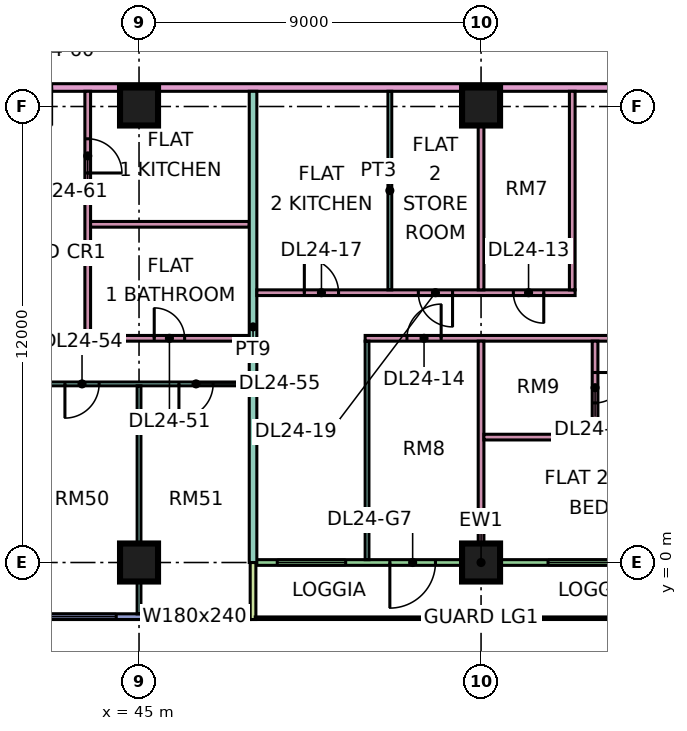
"""IFC4 building model, lengths in metres.
Left out: names, types, materials, properties, quantities, classifications, styles, units other than length and angle.
Written with IfcOpenShell. Run it as: python <this file> out.ifc"""

import sys

from ifc_helpers import new_model, si_unit, direction, frame, frame_2d, origin, origin_2d, place, context, subcontext, project, spatial, rectangle, extrude, element, fill, save


model = new_model("IFC4")
c1 = context("Model", 3, precision=1e-05, world=origin(), true_north=direction((0.0, 1.0)))
c2 = subcontext(c1, "Body", "Model", "MODEL_VIEW")
j1 = project(units=[si_unit("LENGTHUNIT", "METRE"), si_unit("PLANEANGLEUNIT", "RADIAN")], contexts=[c1])
p1 = place(None, origin())
s1 = spatial("IfcSite", under=j1, at=p1, CompositionType="ELEMENT")
p2 = place(p1, origin())
s2 = spatial("IfcBuilding", under=s1, at=p2, CompositionType="ELEMENT")
p3 = place(p2, frame((0.0, 0.0, 106.9)))
s3 = spatial("IfcBuildingStorey", under=s2, at=p3, CompositionType="ELEMENT", Elevation=106.9)
for number, where, z_axis, x_axis in (
    (1, (45.0, 0.0, 0.0), (0.0, 0.0, 1.0), (1.0, 0.0, 0.0)),
    (2, (45.0, 12.0, 0.0), (0.0, 0.0, 1.0), (1.0, 0.0, 0.0)),
    (3, (54.0, 0.0, 0.0), (0.0, 0.0, 1.0), (1.0, 0.0, 0.0)),
    (4, (54.0, 12.0, 0.0), (0.0, 0.0, 1.0), (1.0, 0.0, 0.0)),
):
    element("IfcColumn", number, at=place(p3, frame(where, z_axis=z_axis, x_axis=x_axis)), inside=s3, PredefinedType="COLUMN", context=c2, shape_type="SweptSolid", body=[
        extrude(rectangle(XDim=1.0, YDim=1.0, at=origin_2d()), origin(), (0.0, 0.0, 1.0), 3.75),
    ])
p4 = place(p3, frame((36.075, -1.425, 0.0), z_axis=(0.0, 0.0, 1.0), x_axis=(1.0, 0.0, 0.0)))
e5 = element("IfcWall", 5, at=p4, inside=s3, PredefinedType="SOLIDWALL", context=c2, shape_type="SweptSolid", body=[
    extrude(rectangle(XDim=11.85, YDim=0.15, at=frame_2d((5.925, 0.0))), origin(), (0.0, 0.0, 1.0), 3.35),
])
p5 = place(p4, frame((1.462, 0.0, 0.45)))
e6 = element("IfcOpeningElement", 6, at=p5, cuts=e5, PredefinedType="OPENING", context=c2, shape_type="SweptSolid", body=[
    extrude(rectangle(XDim=3.0, YDim=2.4, at=frame_2d((1.5, 1.2))), frame((0.0, 0.085, 0.0), z_axis=(0.0, -1.0, 0.0), x_axis=(1.0, 0.0, 0.0)), (0.0, 0.0, 1.0), 0.17),
])
p6 = place(p4, frame((6.525, 0.0, 0.45)))
e7 = element("IfcOpeningElement", 7, at=p6, cuts=e5, PredefinedType="OPENING", context=c2, shape_type="SweptSolid", body=[
    extrude(rectangle(XDim=1.8, YDim=2.4, at=frame_2d((0.9, 1.2))), frame((0.0, 0.085, 0.0), z_axis=(0.0, -1.0, 0.0), x_axis=(1.0, 0.0, 0.0)), (0.0, 0.0, 1.0), 0.17),
])
p7 = place(p4, frame((9.488, 0.0, 0.45)))
e8 = element("IfcOpeningElement", 8, at=p7, cuts=e5, PredefinedType="OPENING", context=c2, shape_type="SweptSolid", body=[
    extrude(rectangle(XDim=1.8, YDim=2.4, at=frame_2d((0.9, 1.2))), frame((0.0, 0.085, 0.0), z_axis=(0.0, -1.0, 0.0), x_axis=(1.0, 0.0, 0.0)), (0.0, 0.0, 1.0), 0.17),
])
p8 = place(p3, frame((48.075, 0.0, 0.0), z_axis=(0.0, 0.0, 1.0), x_axis=(1.0, 0.0, 0.0)))
e9 = element("IfcWall", 9, at=p8, inside=s3, PredefinedType="SOLIDWALL", context=c2, shape_type="SweptSolid", body=[
    extrude(rectangle(XDim=11.85, YDim=0.15, at=frame_2d((5.925, 0.0))), origin(), (0.0, 0.0, 1.0), 3.35),
])
p9 = place(p8, frame((0.562, 0.0, 0.45)))
e10 = element("IfcOpeningElement", 10, at=p9, cuts=e9, PredefinedType="OPENING", context=c2, shape_type="SweptSolid", body=[
    extrude(rectangle(XDim=1.8, YDim=2.4, at=frame_2d((0.9, 1.2))), frame((0.0, 0.085, 0.0), z_axis=(0.0, -1.0, 0.0), x_axis=(1.0, 0.0, 0.0)), (0.0, 0.0, 1.0), 0.17),
])
p10 = place(p8, frame((3.525, 0.0, 0.0)))
e11 = element("IfcOpeningElement", 11, at=p10, cuts=e9, PredefinedType="OPENING", context=c2, shape_type="SweptSolid", body=[
    extrude(rectangle(XDim=1.2, YDim=2.4, at=frame_2d((0.6, 1.2))), frame((0.0, 0.085, 0.0), z_axis=(0.0, -1.0, 0.0), x_axis=(1.0, 0.0, 0.0)), (0.0, 0.0, 1.0), 0.17),
])
p11 = place(p8, frame((7.688, 0.0, 0.45)))
e12 = element("IfcOpeningElement", 12, at=p11, cuts=e9, PredefinedType="OPENING", context=c2, shape_type="SweptSolid", body=[
    extrude(rectangle(XDim=3.0, YDim=2.4, at=frame_2d((1.5, 1.2))), frame((0.0, 0.085, 0.0), z_axis=(0.0, -1.0, 0.0), x_axis=(1.0, 0.0, 0.0)), (0.0, 0.0, 1.0), 0.17),
])
p12 = place(p3, frame((48.0, -1.5, 0.0), z_axis=(0.0, 0.0, 1.0), x_axis=(0.0, 1.0, 0.0)))
e13 = element("IfcWall", 13, at=p12, inside=s3, PredefinedType="SOLIDWALL", context=c2, shape_type="SweptSolid", body=[
    extrude(rectangle(XDim=1.5, YDim=0.15, at=frame_2d((0.75, 0.0))), origin(), (0.0, 0.0, 1.0), 3.35),
])
p13 = place(p3, frame((33.05, 4.7, 0.0), z_axis=(0.0, 0.0, 1.0), x_axis=(1.0, 0.0, 0.0)))
e14 = element("IfcWall", 14, at=p13, inside=s3, PredefinedType="PARTITIONING", context=c2, shape_type="SweptSolid", body=[
    extrude(rectangle(XDim=14.85, YDim=0.1, at=frame_2d((7.425, 0.0))), origin(), (0.0, 0.0, 1.0), 3.35),
])
p14 = place(p13, frame((10.0, 0.0, 0.0)))
e15 = element("IfcOpeningElement", 15, at=p14, cuts=e14, PredefinedType="OPENING", context=c2, shape_type="SweptSolid", body=[
    extrude(rectangle(XDim=0.9, YDim=2.1, at=frame_2d((0.45, 1.05))), frame((0.0, 0.06, 0.0), z_axis=(0.0, -1.0, 0.0), x_axis=(1.0, 0.0, 0.0)), (0.0, 0.0, 1.0), 0.12),
])
p15 = place(p13, frame((13.0, 0.0, 0.0)))
e16 = element("IfcOpeningElement", 16, at=p15, cuts=e14, PredefinedType="OPENING", context=c2, shape_type="SweptSolid", body=[
    extrude(rectangle(XDim=0.9, YDim=2.1, at=frame_2d((0.45, 1.05))), frame((0.0, 0.06, 0.0), z_axis=(0.0, -1.0, 0.0), x_axis=(1.0, 0.0, 0.0)), (0.0, 0.0, 1.0), 0.12),
])
p16 = place(p13, frame((4.0, 0.0, 0.0)))
e17 = element("IfcOpeningElement", 17, at=p16, cuts=e14, PredefinedType="OPENING", context=c2, shape_type="SweptSolid", body=[
    extrude(rectangle(XDim=0.9, YDim=2.1, at=frame_2d((0.45, 1.05))), frame((0.0, 0.06, 0.0), z_axis=(0.0, -1.0, 0.0), x_axis=(1.0, 0.0, 0.0)), (0.0, 0.0, 1.0), 0.12),
])
p17 = place(p3, frame((40.65, 12.5, 0.0), z_axis=(0.0, 0.0, 1.0), x_axis=(1.0, 0.0, 0.0)))
e18 = element("IfcWall", 18, at=p17, inside=s3, PredefinedType="PARTITIONING", context=c2, shape_type="SweptSolid", body=[
    extrude(rectangle(XDim=31.35, YDim=0.2, at=frame_2d((15.675, 0.0))), origin(), (0.0, 0.0, 1.0), 3.35),
])
p18 = place(p17, frame((17.1, 0.0, 0.0)))
e19 = element("IfcOpeningElement", 19, at=p18, cuts=e18, PredefinedType="OPENING", context=c2, shape_type="SweptSolid", body=[
    extrude(rectangle(XDim=1.0, YDim=2.1, at=frame_2d((0.5, 1.05))), frame((0.0, 0.11, 0.0), z_axis=(0.0, -1.0, 0.0), x_axis=(1.0, 0.0, 0.0)), (0.0, 0.0, 1.0), 0.22),
])
p19 = place(p17, frame((23.7, 0.0, 0.0)))
e20 = element("IfcOpeningElement", 20, at=p19, cuts=e18, PredefinedType="OPENING", context=c2, shape_type="SweptSolid", body=[
    extrude(rectangle(XDim=1.0, YDim=2.1, at=frame_2d((0.5, 1.05))), frame((0.0, 0.11, 0.0), z_axis=(0.0, -1.0, 0.0), x_axis=(1.0, 0.0, 0.0)), (0.0, 0.0, 1.0), 0.22),
])
p20 = place(p17, frame((1.05, 0.0, 0.0)))
e21 = element("IfcOpeningElement", 21, at=p20, cuts=e18, PredefinedType="OPENING", context=c2, shape_type="SweptSolid", body=[
    extrude(rectangle(XDim=1.0, YDim=2.1, at=frame_2d((0.5, 1.05))), frame((0.0, 0.11, 0.0), z_axis=(0.0, -1.0, 0.0), x_axis=(1.0, 0.0, 0.0)), (0.0, 0.0, 1.0), 0.22),
])
p21 = place(p3, frame((43.65, 5.825, 0.0), z_axis=(0.0, 0.0, 1.0), x_axis=(0.0, 1.0, 0.0)))
e22 = element("IfcWall", 22, at=p21, inside=s3, PredefinedType="PARTITIONING", context=c2, shape_type="SweptSolid", body=[
    extrude(rectangle(XDim=6.575, YDim=0.15, at=frame_2d((3.288, 0.0))), origin(), (0.0, 0.0, 1.0), 3.35),
])
p22 = place(p21, frame((4.425, 0.0, 0.0)))
e23 = element("IfcOpeningElement", 23, at=p22, cuts=e22, PredefinedType="OPENING", context=c2, shape_type="SweptSolid", body=[
    extrude(rectangle(XDim=0.9, YDim=2.1, at=frame_2d((0.45, 1.05))), frame((0.0, 0.085, 0.0), z_axis=(0.0, -1.0, 0.0), x_axis=(1.0, 0.0, 0.0)), (0.0, 0.0, 1.0), 0.17),
])
p23 = place(p3, frame((43.725, 5.9, 0.0), z_axis=(0.0, 0.0, 1.0), x_axis=(1.0, 0.0, 0.0)))
e24 = element("IfcWall", 24, at=p23, inside=s3, PredefinedType="PARTITIONING", context=c2, shape_type="SweptSolid", body=[
    extrude(rectangle(XDim=4.175, YDim=0.15, at=frame_2d((2.087, 0.0))), origin(), (0.0, 0.0, 1.0), 3.35),
])
p24 = place(p23, frame((1.675, 0.0, 0.0)))
e25 = element("IfcOpeningElement", 25, at=p24, cuts=e24, PredefinedType="OPENING", context=c2, shape_type="SweptSolid", body=[
    extrude(rectangle(XDim=0.8, YDim=2.1, at=frame_2d((0.4, 1.05))), frame((0.0, 0.085, 0.0), z_axis=(0.0, -1.0, 0.0), x_axis=(1.0, 0.0, 0.0)), (0.0, 0.0, 1.0), 0.17),
])
p25 = place(p3, frame((43.725, 8.9, 0.0), z_axis=(0.0, 0.0, 1.0), x_axis=(1.0, 0.0, 0.0)))
e26 = element("IfcWall", 26, at=p25, inside=s3, PredefinedType="PARTITIONING", context=c2, shape_type="SweptSolid", body=[
    extrude(rectangle(XDim=4.175, YDim=0.15, at=frame_2d((2.087, 0.0))), origin(), (0.0, 0.0, 1.0), 3.35),
])
p26 = place(p3, frame((45.0, -1.351, 0.0), z_axis=(0.0, 0.0, 1.0), x_axis=(0.0, 1.0, 0.0)))
e27 = element("IfcWall", 27, at=p26, inside=s3, PredefinedType="PARTITIONING", context=c2, shape_type="SweptSolid", body=[
    extrude(rectangle(XDim=6.001, YDim=0.1, at=frame_2d((3.0, 0.0))), origin(), (0.0, 0.0, 1.0), 3.35),
])
p27 = place(p3, frame((48.0, 0.0, 0.0), z_axis=(0.0, 0.0, 1.0), x_axis=(0.0, 1.0, 0.0)))
e28 = element("IfcWall", 28, at=p27, inside=s3, PredefinedType="PARTITIONING", context=c2, shape_type="SweptSolid", body=[
    extrude(rectangle(XDim=12.4, YDim=0.2, at=frame_2d((6.2, 0.0))), origin(), (0.0, 0.0, 1.0), 3.35),
])
p28 = place(p3, frame((48.1, 7.1, 0.0), z_axis=(0.0, 0.0, 1.0), x_axis=(1.0, 0.0, 0.0)))
e29 = element("IfcWall", 29, at=p28, inside=s3, PredefinedType="PARTITIONING", context=c2, shape_type="SweptSolid", body=[
    extrude(rectangle(XDim=8.375, YDim=0.15, at=frame_2d((4.188, 0.0))), origin(), (0.0, 0.0, 1.0), 3.35),
])
p29 = place(p28, frame((6.75, 0.0, 0.0)))
e30 = element("IfcOpeningElement", 30, at=p29, cuts=e29, PredefinedType="OPENING", context=c2, shape_type="SweptSolid", body=[
    extrude(rectangle(XDim=0.8, YDim=2.1, at=frame_2d((0.4, 1.05))), frame((0.0, 0.085, 0.0), z_axis=(0.0, -1.0, 0.0), x_axis=(1.0, 0.0, 0.0)), (0.0, 0.0, 1.0), 0.17),
])
p30 = place(p28, frame((1.25, 0.0, 0.0)))
e31 = element("IfcOpeningElement", 31, at=p30, cuts=e29, PredefinedType="OPENING", context=c2, shape_type="SweptSolid", body=[
    extrude(rectangle(XDim=0.9, YDim=2.1, at=frame_2d((0.45, 1.05))), frame((0.0, 0.085, 0.0), z_axis=(0.0, -1.0, 0.0), x_axis=(1.0, 0.0, 0.0)), (0.0, 0.0, 1.0), 0.17),
])
p31 = place(p28, frame((4.25, 0.0, 0.0)))
e32 = element("IfcOpeningElement", 32, at=p31, cuts=e29, PredefinedType="OPENING", context=c2, shape_type="SweptSolid", body=[
    extrude(rectangle(XDim=0.9, YDim=2.1, at=frame_2d((0.45, 1.05))), frame((0.0, 0.085, 0.0), z_axis=(0.0, -1.0, 0.0), x_axis=(1.0, 0.0, 0.0)), (0.0, 0.0, 1.0), 0.17),
])
p32 = place(p3, frame((50.95, 5.9, 0.0), z_axis=(0.0, 0.0, 1.0), x_axis=(1.0, 0.0, 0.0)))
e33 = element("IfcWall", 33, at=p32, inside=s3, PredefinedType="PARTITIONING", context=c2, shape_type="SweptSolid", body=[
    extrude(rectangle(XDim=8.95, YDim=0.15, at=frame_2d((4.475, 0.0))), origin(), (0.0, 0.0, 1.0), 3.35),
])
p33 = place(p32, frame((1.1, 0.0, 0.0)))
e34 = element("IfcOpeningElement", 34, at=p33, cuts=e33, PredefinedType="OPENING", context=c2, shape_type="SweptSolid", body=[
    extrude(rectangle(XDim=0.9, YDim=2.1, at=frame_2d((0.45, 1.05))), frame((0.0, 0.085, 0.0), z_axis=(0.0, -1.0, 0.0), x_axis=(1.0, 0.0, 0.0)), (0.0, 0.0, 1.0), 0.17),
])
p34 = place(p32, frame((7.1, 0.0, 0.0)))
e35 = element("IfcOpeningElement", 35, at=p34, cuts=e33, PredefinedType="OPENING", context=c2, shape_type="SweptSolid", body=[
    extrude(rectangle(XDim=0.9, YDim=2.1, at=frame_2d((0.45, 1.05))), frame((0.0, 0.085, 0.0), z_axis=(0.0, -1.0, 0.0), x_axis=(1.0, 0.0, 0.0)), (0.0, 0.0, 1.0), 0.17),
])
p35 = place(p3, frame((51.0, 0.074, 0.0), z_axis=(0.0, 0.0, 1.0), x_axis=(0.0, 1.0, 0.0)))
e36 = element("IfcWall", 36, at=p35, inside=s3, PredefinedType="PARTITIONING", context=c2, shape_type="SweptSolid", body=[
    extrude(rectangle(XDim=5.751, YDim=0.1, at=frame_2d((2.875, 0.0))), origin(), (0.0, 0.0, 1.0), 3.35),
])
p36 = place(p3, frame((51.6, 7.175, 0.0), z_axis=(0.0, 0.0, 1.0), x_axis=(0.0, 1.0, 0.0)))
e37 = element("IfcWall", 37, at=p36, inside=s3, PredefinedType="PARTITIONING", context=c2, shape_type="SweptSolid", body=[
    extrude(rectangle(XDim=5.225, YDim=0.1, at=frame_2d((2.612, 0.0))), origin(), (0.0, 0.0, 1.0), 3.35),
])
p37 = place(p3, frame((54.0, 0.074, 0.0), z_axis=(0.0, 0.0, 1.0), x_axis=(0.0, 1.0, 0.0)))
e38 = element("IfcWall", 38, at=p37, inside=s3, PredefinedType="PARTITIONING", context=c2, shape_type="SweptSolid", body=[
    extrude(rectangle(XDim=5.751, YDim=0.15, at=frame_2d((2.875, 0.0))), origin(), (0.0, 0.0, 1.0), 3.35),
])
p38 = place(p3, frame((54.0, 7.175, 0.0), z_axis=(0.0, 0.0, 1.0), x_axis=(0.0, 1.0, 0.0)))
e39 = element("IfcWall", 39, at=p38, inside=s3, PredefinedType="PARTITIONING", context=c2, shape_type="SweptSolid", body=[
    extrude(rectangle(XDim=5.225, YDim=0.15, at=frame_2d((2.612, 0.0))), origin(), (0.0, 0.0, 1.0), 3.35),
])
p39 = place(p3, frame((54.075, 3.3, 0.0), z_axis=(0.0, 0.0, 1.0), x_axis=(1.0, 0.0, 0.0)))
e40 = element("IfcWall", 40, at=p39, inside=s3, PredefinedType="PARTITIONING", context=c2, shape_type="SweptSolid", body=[
    extrude(rectangle(XDim=3.0, YDim=0.15, at=frame_2d((1.5, 0.0))), origin(), (0.0, 0.0, 1.0), 3.35),
])
p40 = place(p3, frame((56.4, 7.175, 0.0), z_axis=(0.0, 0.0, 1.0), x_axis=(0.0, 1.0, 0.0)))
e41 = element("IfcWall", 41, at=p40, inside=s3, PredefinedType="PARTITIONING", context=c2, shape_type="SweptSolid", body=[
    extrude(rectangle(XDim=5.225, YDim=0.15, at=frame_2d((2.612, 0.0))), origin(), (0.0, 0.0, 1.0), 3.35),
])
p41 = place(p3, frame((57.0, 3.375, 0.0), z_axis=(0.0, 0.0, 1.0), x_axis=(0.0, 1.0, 0.0)))
e42 = element("IfcWall", 42, at=p41, inside=s3, PredefinedType="PARTITIONING", context=c2, shape_type="SweptSolid", body=[
    extrude(rectangle(XDim=2.45, YDim=0.15, at=frame_2d((1.225, 0.0))), origin(), (0.0, 0.0, 1.0), 3.35),
])
p42 = place(p41, frame((0.825, 0.0, 0.0)))
e43 = element("IfcOpeningElement", 43, at=p42, cuts=e42, PredefinedType="OPENING", context=c2, shape_type="SweptSolid", body=[
    extrude(rectangle(XDim=0.8, YDim=2.1, at=frame_2d((0.4, 1.05))), frame((0.0, 0.085, 0.0), z_axis=(0.0, -1.0, 0.0), x_axis=(1.0, 0.0, 0.0)), (0.0, 0.0, 1.0), 0.17),
])
p43 = place(p6, origin())
e44 = element("IfcWindow", 44, at=p43, inside=s3, PartitioningType="SINGLE_PANEL", PredefinedType="WINDOW", context=c2, shape_type="SweptSolid", body=[
    extrude(rectangle(XDim=1.8, YDim=2.4, at=frame_2d((0.9, 1.2))), frame((0.0, 0.03, 0.0), z_axis=(0.0, -1.0, 0.0), x_axis=(1.0, 0.0, 0.0)), (0.0, 0.0, 1.0), 0.06),
])
fill(e7, e44)
p44 = place(p7, origin())
e45 = element("IfcWindow", 45, at=p44, inside=s3, PartitioningType="SINGLE_PANEL", PredefinedType="WINDOW", context=c2, shape_type="SweptSolid", body=[
    extrude(rectangle(XDim=1.8, YDim=2.4, at=frame_2d((0.9, 1.2))), frame((0.0, 0.03, 0.0), z_axis=(0.0, -1.0, 0.0), x_axis=(1.0, 0.0, 0.0)), (0.0, 0.0, 1.0), 0.06),
])
fill(e8, e45)
p45 = place(p9, origin())
e46 = element("IfcWindow", 46, at=p45, inside=s3, PartitioningType="SINGLE_PANEL", PredefinedType="WINDOW", context=c2, shape_type="SweptSolid", body=[
    extrude(rectangle(XDim=1.8, YDim=2.4, at=frame_2d((0.9, 1.2))), frame((0.0, 0.03, 0.0), z_axis=(0.0, -1.0, 0.0), x_axis=(1.0, 0.0, 0.0)), (0.0, 0.0, 1.0), 0.06),
])
fill(e10, e46)
p46 = place(p10, frame((1.2, 0.0, 0.0), z_axis=(0.0, 0.0, 1.0), x_axis=(-1.0, 0.0, 0.0)))
e47 = element("IfcDoor", 47, at=p46, inside=s3, OperationType="DOUBLE_DOOR_SINGLE_SWING", PredefinedType="DOOR", context=c2, shape_type="SweptSolid", body=[
    extrude(rectangle(XDim=1.2, YDim=2.4, at=frame_2d((0.6, 1.2))), frame((0.0, 0.025, 0.0), z_axis=(0.0, -1.0, 0.0), x_axis=(1.0, 0.0, 0.0)), (0.0, 0.0, 1.0), 0.05),
])
fill(e11, e47)
p47 = place(p11, origin())
e48 = element("IfcWindow", 48, at=p47, inside=s3, PartitioningType="SINGLE_PANEL", PredefinedType="WINDOW", context=c2, shape_type="SweptSolid", body=[
    extrude(rectangle(XDim=3.0, YDim=2.4, at=frame_2d((1.5, 1.2))), frame((0.0, 0.03, 0.0), z_axis=(0.0, -1.0, 0.0), x_axis=(1.0, 0.0, 0.0)), (0.0, 0.0, 1.0), 0.06),
])
fill(e12, e48)
p48 = place(p29, origin())
e49 = element("IfcDoor", 49, at=p48, inside=s3, OperationType="SINGLE_SWING_RIGHT", PredefinedType="DOOR", context=c2, shape_type="SweptSolid", body=[
    extrude(rectangle(XDim=0.8, YDim=2.1, at=frame_2d((0.4, 1.05))), frame((0.0, 0.025, 0.0), z_axis=(0.0, -1.0, 0.0), x_axis=(1.0, 0.0, 0.0)), (0.0, 0.0, 1.0), 0.05),
])
fill(e30, e49)
p49 = place(p33, frame((0.9, 0.0, 0.0), z_axis=(0.0, 0.0, 1.0), x_axis=(-1.0, 0.0, 0.0)))
e50 = element("IfcDoor", 50, at=p49, inside=s3, OperationType="SINGLE_SWING_RIGHT", PredefinedType="DOOR", context=c2, shape_type="SweptSolid", body=[
    extrude(rectangle(XDim=0.9, YDim=2.1, at=frame_2d((0.45, 1.05))), frame((0.0, 0.025, 0.0), z_axis=(0.0, -1.0, 0.0), x_axis=(1.0, 0.0, 0.0)), (0.0, 0.0, 1.0), 0.05),
])
fill(e34, e50)
p50 = place(p42, origin())
e51 = element("IfcDoor", 51, at=p50, inside=s3, OperationType="SINGLE_SWING_RIGHT", PredefinedType="DOOR", context=c2, shape_type="SweptSolid", body=[
    extrude(rectangle(XDim=0.8, YDim=2.1, at=frame_2d((0.4, 1.05))), frame((0.0, 0.025, 0.0), z_axis=(0.0, -1.0, 0.0), x_axis=(1.0, 0.0, 0.0)), (0.0, 0.0, 1.0), 0.05),
])
fill(e43, e51)
p51 = place(p30, origin())
e52 = element("IfcDoor", 52, at=p51, inside=s3, OperationType="SINGLE_SWING_LEFT", PredefinedType="DOOR", context=c2, shape_type="SweptSolid", body=[
    extrude(rectangle(XDim=0.9, YDim=2.1, at=frame_2d((0.45, 1.05))), frame((0.0, 0.025, 0.0), z_axis=(0.0, -1.0, 0.0), x_axis=(1.0, 0.0, 0.0)), (0.0, 0.0, 1.0), 0.05),
])
fill(e31, e52)
p52 = place(p31, origin())
e53 = element("IfcDoor", 53, at=p52, inside=s3, OperationType="SINGLE_SWING_RIGHT", PredefinedType="DOOR", context=c2, shape_type="SweptSolid", body=[
    extrude(rectangle(XDim=0.9, YDim=2.1, at=frame_2d((0.45, 1.05))), frame((0.0, 0.025, 0.0), z_axis=(0.0, -1.0, 0.0), x_axis=(1.0, 0.0, 0.0)), (0.0, 0.0, 1.0), 0.05),
])
fill(e32, e53)
p53 = place(p24, origin())
e54 = element("IfcDoor", 54, at=p53, inside=s3, OperationType="SINGLE_SWING_LEFT", PredefinedType="DOOR", context=c2, shape_type="SweptSolid", body=[
    extrude(rectangle(XDim=0.8, YDim=2.1, at=frame_2d((0.4, 1.05))), frame((0.0, 0.025, 0.0), z_axis=(0.0, -1.0, 0.0), x_axis=(1.0, 0.0, 0.0)), (0.0, 0.0, 1.0), 0.05),
])
fill(e25, e54)
p54 = place(p14, frame((0.9, 0.0, 0.0), z_axis=(0.0, 0.0, 1.0), x_axis=(-1.0, 0.0, 0.0)))
e55 = element("IfcDoor", 55, at=p54, inside=s3, OperationType="SINGLE_SWING_LEFT", PredefinedType="DOOR", context=c2, shape_type="SweptSolid", body=[
    extrude(rectangle(XDim=0.9, YDim=2.1, at=frame_2d((0.45, 1.05))), frame((0.0, 0.025, 0.0), z_axis=(0.0, -1.0, 0.0), x_axis=(1.0, 0.0, 0.0)), (0.0, 0.0, 1.0), 0.05),
])
fill(e15, e55)
p55 = place(p15, frame((0.9, 0.0, 0.0), z_axis=(0.0, 0.0, 1.0), x_axis=(-1.0, 0.0, 0.0)))
e56 = element("IfcDoor", 56, at=p55, inside=s3, OperationType="SINGLE_SWING_LEFT", PredefinedType="DOOR", context=c2, shape_type="SweptSolid", body=[
    extrude(rectangle(XDim=0.9, YDim=2.1, at=frame_2d((0.45, 1.05))), frame((0.0, 0.025, 0.0), z_axis=(0.0, -1.0, 0.0), x_axis=(1.0, 0.0, 0.0)), (0.0, 0.0, 1.0), 0.05),
])
fill(e16, e56)
p56 = place(p22, frame((0.9, 0.0, 0.0), z_axis=(0.0, 0.0, 1.0), x_axis=(-1.0, 0.0, 0.0)))
e57 = element("IfcDoor", 57, at=p56, inside=s3, OperationType="SINGLE_SWING_LEFT", PredefinedType="DOOR", context=c2, shape_type="SweptSolid", body=[
    extrude(rectangle(XDim=0.9, YDim=2.1, at=frame_2d((0.45, 1.05))), frame((0.0, 0.025, 0.0), z_axis=(0.0, -1.0, 0.0), x_axis=(1.0, 0.0, 0.0)), (0.0, 0.0, 1.0), 0.05),
])
fill(e23, e57)
save(model, sys.argv[1])
